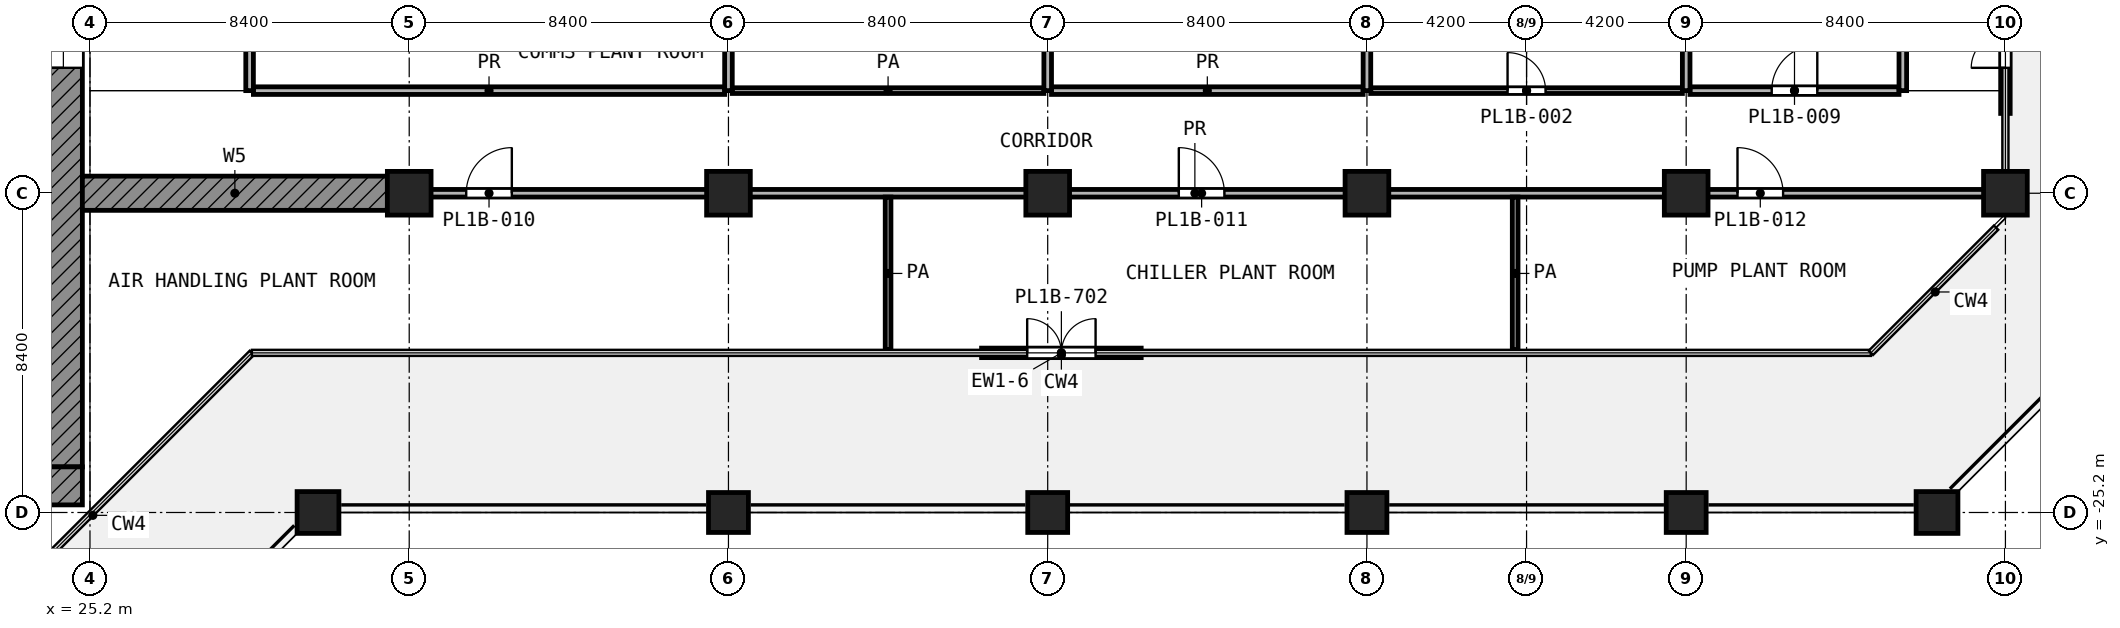
"""IFC4 building model, lengths in metres.
Left out: names, types, materials, properties, quantities, classifications, styles, units other than length and angle.
Written with IfcOpenShell. Run it as: python <this file> out.ifc"""

import sys

from ifc_helpers import new_model, si_unit, direction, frame, frame_2d, origin, origin_2d, place, context, subcontext, project, spatial, rectangle, extrude, element, fill, save


model = new_model("IFC4")
c1 = context("Model", 3, precision=1e-05, world=origin(), true_north=direction((0.0, 1.0)))
c2 = subcontext(c1, "Body", "Model", "MODEL_VIEW")
j1 = project(units=[si_unit("LENGTHUNIT", "METRE"), si_unit("PLANEANGLEUNIT", "RADIAN")], contexts=[c1])
p1 = place(None, origin())
s1 = spatial("IfcSite", under=j1, at=p1, CompositionType="ELEMENT")
p2 = place(p1, origin())
s2 = spatial("IfcBuilding", under=s1, at=p2, CompositionType="ELEMENT")
p3 = place(p2, frame((0.0, 0.0, 93.8)))
s3 = spatial("IfcBuildingStorey", under=s2, at=p3, CompositionType="ELEMENT", Elevation=93.8)
for number, where, z_axis, x_axis in (
    (1, (33.6, -16.8, 0.0), (0.0, 0.0, 1.0), (1.0, 0.0, 0.0)),
    (2, (42.0, -16.8, 0.0), (0.0, 0.0, 1.0), (1.0, 0.0, 0.0)),
    (3, (50.4, -16.8, 0.0), (0.0, 0.0, 1.0), (1.0, 0.0, 0.0)),
    (4, (58.8, -16.8, 0.0), (0.0, 0.0, 1.0), (1.0, 0.0, 0.0)),
    (5, (67.2, -16.8, 0.0), (0.0, 0.0, 1.0), (1.0, 0.0, 0.0)),
    (6, (75.6, -16.8, 0.0), (0.0, 0.0, 1.0), (1.0, 0.0, 0.0)),
):
    element("IfcColumn", number, at=place(p3, frame(where, z_axis=z_axis, x_axis=x_axis)), inside=s3, PredefinedType="COLUMN", context=c2, shape_type="SweptSolid", body=[
        extrude(rectangle(XDim=1.15, YDim=1.15, at=origin_2d()), origin(), (0.0, 0.0, 1.0), 5.0),
    ])
p4 = place(p3, frame((31.2, -25.2, 0.0), z_axis=(0.0, 0.0, 1.0), x_axis=(1.0, 0.0, 0.0)))
e7 = element("IfcColumn", 7, at=p4, inside=s3, PredefinedType="COLUMN", context=c2, shape_type="SweptSolid", body=[
    extrude(rectangle(XDim=1.1, YDim=1.1, at=origin_2d()), origin(), (0.0, 0.0, 1.0), 5.0),
])
for number, where, z_axis, x_axis in (
    (8, (42.0, -25.2, 0.0), (0.0, 0.0, 1.0), (1.0, 0.0, 0.0)),
    (9, (50.4, -25.2, 0.0), (0.0, 0.0, 1.0), (1.0, 0.0, 0.0)),
    (10, (58.8, -25.2, 0.0), (0.0, 0.0, 1.0), (1.0, 0.0, 0.0)),
    (11, (67.2, -25.2, 0.0), (0.0, 0.0, 1.0), (1.0, 0.0, 0.0)),
):
    element("IfcColumn", number, at=place(p3, frame(where, z_axis=z_axis, x_axis=x_axis)), inside=s3, PredefinedType="COLUMN", context=c2, shape_type="SweptSolid", body=[
        extrude(rectangle(XDim=1.05, YDim=1.05, at=origin_2d()), origin(), (0.0, 0.0, 1.0), 5.0),
    ])
p5 = place(p3, frame((73.8, -25.2, 0.0), z_axis=(0.0, 0.0, 1.0), x_axis=(1.0, 0.0, 0.0)))
e12 = element("IfcColumn", 12, at=p5, inside=s3, PredefinedType="COLUMN", context=c2, shape_type="SweptSolid", body=[
    extrude(rectangle(XDim=1.1, YDim=1.1, at=origin_2d()), origin(), (0.0, 0.0, 1.0), 5.0),
])
p6 = place(p3, frame((25.0, -16.8, 0.0), z_axis=(0.0, 0.0, 1.0), x_axis=(1.0, 0.0, 0.0)))
e13 = element("IfcWall", 13, at=p6, inside=s3, PredefinedType="SHEAR", context=c2, shape_type="SweptSolid", body=[
    extrude(rectangle(XDim=8.025, YDim=0.9, at=frame_2d((4.012, 0.0))), origin(), (0.0, 0.0, 1.0), 4.4),
])
p7 = place(p3, frame((48.66, -21.0, 0.0), z_axis=(0.0, 0.0, 1.0), x_axis=(1.0, 0.0, 0.0)))
e14 = element("IfcWall", 14, at=p7, inside=s3, PredefinedType="SOLIDWALL", context=c2, shape_type="SweptSolid", body=[
    extrude(rectangle(XDim=4.2, YDim=0.25, at=frame_2d((2.1, 0.0))), origin(), (0.0, 0.0, 1.0), 4.24),
])
p8 = place(p7, frame((1.2, 0.0, 0.0)))
e15 = element("IfcOpeningElement", 15, at=p8, cuts=e14, PredefinedType="OPENING", context=c2, shape_type="SweptSolid", body=[
    extrude(rectangle(XDim=1.8, YDim=2.1, at=frame_2d((0.9, 1.05))), frame((0.0, 0.135, 0.0), z_axis=(0.0, -1.0, 0.0), x_axis=(1.0, 0.0, 0.0)), (0.0, 0.0, 1.0), 0.27),
])
p9 = place(p3, frame((75.6, -14.7, 0.0), z_axis=(0.0, 0.0, 1.0), x_axis=(0.0, 1.0, 0.0)))
e16 = element("IfcWall", 16, at=p9, inside=s3, PredefinedType="SOLIDWALL", context=c2, shape_type="SweptSolid", body=[
    extrude(rectangle(XDim=4.2, YDim=0.25, at=frame_2d((2.1, 0.0))), origin(), (0.0, 0.0, 1.0), 4.24),
])
p10 = place(p9, frame((1.2, 0.0, 0.0)))
e17 = element("IfcOpeningElement", 17, at=p10, cuts=e16, PredefinedType="OPENING", context=c2, shape_type="SweptSolid", body=[
    extrude(rectangle(XDim=1.8, YDim=2.1, at=frame_2d((0.9, 1.05))), frame((0.0, 0.135, 0.0), z_axis=(0.0, -1.0, 0.0), x_axis=(1.0, 0.0, 0.0)), (0.0, 0.0, 1.0), 0.27),
])
p11 = place(p3, frame((24.5, -24.0, 0.0), z_axis=(0.0, 0.0, 1.0), x_axis=(0.0, 1.0, 0.0)))
e18 = element("IfcWall", 18, at=p11, inside=s3, PredefinedType="SHEAR", context=c2, shape_type="SweptSolid", body=[
    extrude(rectangle(XDim=18.6, YDim=1.0, at=frame_2d((9.3, 0.0))), origin(), (0.0, 0.0, 1.0), 4.4),
])
p12 = place(p11, frame((10.5, 0.0, 0.0)))
e19 = element("IfcOpeningElement", 19, at=p12, cuts=e18, PredefinedType="OPENING", context=c2, shape_type="SweptSolid", body=[
    extrude(rectangle(XDim=1.8, YDim=2.1, at=frame_2d((0.9, 1.05))), frame((0.0, 0.51, 0.0), z_axis=(0.0, -1.0, 0.0), x_axis=(1.0, 0.0, 0.0)), (0.0, 0.0, 1.0), 1.02),
])
p13 = place(p3, frame((24.5, -25.0, 0.0), z_axis=(0.0, 0.0, 1.0), x_axis=(0.0, 1.0, 0.0)))
e20 = element("IfcWall", 20, at=p13, inside=s3, PredefinedType="SHEAR", context=c2, shape_type="SweptSolid", body=[
    extrude(rectangle(XDim=1.0, YDim=1.0, at=frame_2d((0.5, 0.0))), origin(), (0.0, 0.0, 1.0), 4.4),
])
p14 = place(p3, frame((42.1, -14.1, 0.0), z_axis=(0.0, 0.0, 1.0), x_axis=(1.0, 0.0, 0.0)))
e21 = element("IfcWall", 21, at=p14, inside=s3, PredefinedType="PARTITIONING", context=c2, shape_type="SweptSolid", body=[
    extrude(rectangle(XDim=8.2, YDim=0.15, at=frame_2d((4.1, 0.0))), origin(), (0.0, 0.0, 1.0), 4.4),
])
p15 = place(p3, frame((58.9, -14.1, 0.0), z_axis=(0.0, 0.0, 1.0), x_axis=(1.0, 0.0, 0.0)))
e22 = element("IfcWall", 22, at=p15, inside=s3, PredefinedType="PARTITIONING", context=c2, shape_type="SweptSolid", body=[
    extrude(rectangle(XDim=8.2, YDim=0.15, at=frame_2d((4.1, 0.0))), origin(), (0.0, 0.0, 1.0), 4.4),
])
p16 = place(p15, frame((3.6, 0.0, 0.0)))
e23 = element("IfcOpeningElement", 23, at=p16, cuts=e22, PredefinedType="OPENING", context=c2, shape_type="SweptSolid", body=[
    extrude(rectangle(XDim=1.0, YDim=2.1, at=frame_2d((0.5, 1.05))), frame((0.0, 0.085, 0.0), z_axis=(0.0, -1.0, 0.0), x_axis=(1.0, 0.0, 0.0)), (0.0, 0.0, 1.0), 0.17),
])
for number, where, z_axis, x_axis in (
    (24, (46.2, -20.92, 0.0), (0.0, 0.0, 1.0), (0.0, 1.0, 0.0)),
    (25, (62.7, -20.92, 0.0), (0.0, 0.0, 1.0), (0.0, 1.0, 0.0)),
):
    element("IfcWall", number, at=place(p3, frame(where, z_axis=z_axis, x_axis=x_axis)), inside=s3, PredefinedType="PARTITIONING", context=c2, shape_type="SweptSolid", body=[
        extrude(rectangle(XDim=4.02, YDim=0.15, at=frame_2d((2.01, 0.0))), origin(), (0.0, 0.0, 1.0), 4.4),
    ])
p17 = place(p3, frame((33.025, -16.8, 0.0), z_axis=(0.0, 0.0, 1.0), x_axis=(1.0, 0.0, 0.0)))
e26 = element("IfcWall", 26, at=p17, inside=s3, PredefinedType="PARTITIONING", context=c2, shape_type="SweptSolid", body=[
    extrude(rectangle(XDim=42.495, YDim=0.2, at=frame_2d((21.248, 0.0))), origin(), (0.0, 0.0, 1.0), 4.4),
])
p18 = place(p17, frame((2.075, 0.0, 0.0)))
e27 = element("IfcOpeningElement", 27, at=p18, cuts=e26, PredefinedType="OPENING", context=c2, shape_type="SweptSolid", body=[
    extrude(rectangle(XDim=1.2, YDim=2.1, at=frame_2d((0.6, 1.05))), frame((0.0, 0.11, 0.0), z_axis=(0.0, -1.0, 0.0), x_axis=(1.0, 0.0, 0.0)), (0.0, 0.0, 1.0), 0.22),
])
p19 = place(p17, frame((20.825, 0.0, 0.0)))
e28 = element("IfcOpeningElement", 28, at=p19, cuts=e26, PredefinedType="OPENING", context=c2, shape_type="SweptSolid", body=[
    extrude(rectangle(XDim=1.2, YDim=2.1, at=frame_2d((0.6, 1.05))), frame((0.0, 0.11, 0.0), z_axis=(0.0, -1.0, 0.0), x_axis=(1.0, 0.0, 0.0)), (0.0, 0.0, 1.0), 0.22),
])
p20 = place(p17, frame((35.525, 0.0, 0.0)))
e29 = element("IfcOpeningElement", 29, at=p20, cuts=e26, PredefinedType="OPENING", context=c2, shape_type="SweptSolid", body=[
    extrude(rectangle(XDim=1.2, YDim=2.1, at=frame_2d((0.6, 1.05))), frame((0.0, 0.11, 0.0), z_axis=(0.0, -1.0, 0.0), x_axis=(1.0, 0.0, 0.0)), (0.0, 0.0, 1.0), 0.22),
])
p21 = place(p3, frame((29.5, -14.1, 0.0), z_axis=(0.0, 0.0, 1.0), x_axis=(1.0, 0.0, 0.0)))
e30 = element("IfcWall", 30, at=p21, inside=s3, PredefinedType="PARTITIONING", context=c2, shape_type="SweptSolid", body=[
    extrude(rectangle(XDim=12.4, YDim=0.2, at=frame_2d((6.2, 0.0))), origin(), (0.0, 0.0, 1.0), 4.4),
])
p22 = place(p3, frame((50.5, -14.1, 0.0), z_axis=(0.0, 0.0, 1.0), x_axis=(1.0, 0.0, 0.0)))
e31 = element("IfcWall", 31, at=p22, inside=s3, PredefinedType="PARTITIONING", context=c2, shape_type="SweptSolid", body=[
    extrude(rectangle(XDim=8.2, YDim=0.2, at=frame_2d((4.1, 0.0))), origin(), (0.0, 0.0, 1.0), 4.4),
])
p23 = place(p3, frame((67.3, -14.1, 0.0), z_axis=(0.0, 0.0, 1.0), x_axis=(1.0, 0.0, 0.0)))
e32 = element("IfcWall", 32, at=p23, inside=s3, PredefinedType="PARTITIONING", context=c2, shape_type="SweptSolid", body=[
    extrude(rectangle(XDim=5.5, YDim=0.2, at=frame_2d((2.75, 0.0))), origin(), (0.0, 0.0, 1.0), 4.4),
])
p24 = place(p23, frame((2.15, 0.0, 0.0)))
e33 = element("IfcOpeningElement", 33, at=p24, cuts=e32, PredefinedType="OPENING", context=c2, shape_type="SweptSolid", body=[
    extrude(rectangle(XDim=1.2, YDim=2.1, at=frame_2d((0.6, 1.05))), frame((0.0, 0.11, 0.0), z_axis=(0.0, -1.0, 0.0), x_axis=(1.0, 0.0, 0.0)), (0.0, 0.0, 1.0), 0.22),
])
p25 = place(p3, frame((29.4, -14.1, 0.0), z_axis=(0.0, 0.0, 1.0), x_axis=(0.0, 1.0, 0.0)))
e34 = element("IfcWall", 34, at=p25, inside=s3, PredefinedType="PARTITIONING", context=c2, shape_type="SweptSolid", body=[
    extrude(rectangle(XDim=2.997, YDim=0.2, at=frame_2d((1.499, 0.0))), origin(), (0.0, 0.0, 1.0), 4.4),
])
for number, where, z_axis, x_axis in (
    (35, (42.0, -14.1, 0.0), (0.0, 0.0, 1.0), (0.0, 1.0, 0.0)),
    (36, (50.4, -14.1, 0.0), (0.0, 0.0, 1.0), (0.0, 1.0, 0.0)),
    (37, (58.8, -14.1, 0.0), (0.0, 0.0, 1.0), (0.0, 1.0, 0.0)),
    (38, (67.2, -14.1, 0.0), (0.0, 0.0, 1.0), (0.0, 1.0, 0.0)),
):
    element("IfcWall", number, at=place(p3, frame(where, z_axis=z_axis, x_axis=x_axis)), inside=s3, PredefinedType="PARTITIONING", context=c2, shape_type="SweptSolid", body=[
        extrude(rectangle(XDim=3.0, YDim=0.2, at=frame_2d((1.5, 0.0))), origin(), (0.0, 0.0, 1.0), 4.4),
    ])
p26 = place(p3, frame((72.9, -14.1, 0.0), z_axis=(0.0, 0.0, 1.0), x_axis=(0.0, 1.0, 0.0)))
e39 = element("IfcWall", 39, at=p26, inside=s3, PredefinedType="PARTITIONING", context=c2, shape_type="SweptSolid", body=[
    extrude(rectangle(XDim=2.997, YDim=0.2, at=frame_2d((1.499, 0.0))), origin(), (0.0, 0.0, 1.0), 4.4),
])
p27 = place(p8, origin())
e40 = element("IfcDoor", 40, at=p27, inside=s3, OperationType="DOUBLE_DOOR_SINGLE_SWING", PredefinedType="DOOR", context=c2, shape_type="SweptSolid", body=[
    extrude(rectangle(XDim=1.8, YDim=2.1, at=frame_2d((0.9, 1.05))), frame((0.0, 0.025, 0.0), z_axis=(0.0, -1.0, 0.0), x_axis=(1.0, 0.0, 0.0)), (0.0, 0.0, 1.0), 0.05),
])
fill(e15, e40)
p28 = place(p10, origin())
e41 = element("IfcDoor", 41, at=p28, inside=s3, OperationType="DOUBLE_DOOR_SINGLE_SWING", PredefinedType="DOOR", context=c2, shape_type="SweptSolid", body=[
    extrude(rectangle(XDim=1.8, YDim=2.1, at=frame_2d((0.9, 1.05))), frame((0.0, 0.025, 0.0), z_axis=(0.0, -1.0, 0.0), x_axis=(1.0, 0.0, 0.0)), (0.0, 0.0, 1.0), 0.05),
])
fill(e17, e41)
p29 = place(p12, origin())
e42 = element("IfcDoor", 42, at=p29, inside=s3, OperationType="DOUBLE_DOOR_SINGLE_SWING", PredefinedType="DOOR", context=c2, shape_type="SweptSolid", body=[
    extrude(rectangle(XDim=1.8, YDim=2.1, at=frame_2d((0.9, 1.05))), frame((0.0, 0.025, 0.0), z_axis=(0.0, -1.0, 0.0), x_axis=(1.0, 0.0, 0.0)), (0.0, 0.0, 1.0), 0.05),
])
fill(e19, e42)
p30 = place(p16, origin())
e43 = element("IfcDoor", 43, at=p30, inside=s3, OperationType="SINGLE_SWING_LEFT", PredefinedType="DOOR", context=c2, shape_type="SweptSolid", body=[
    extrude(rectangle(XDim=1.0, YDim=2.1, at=frame_2d((0.5, 1.05))), frame((0.0, 0.025, 0.0), z_axis=(0.0, -1.0, 0.0), x_axis=(1.0, 0.0, 0.0)), (0.0, 0.0, 1.0), 0.05),
])
fill(e23, e43)
p31 = place(p24, origin())
e44 = element("IfcDoor", 44, at=p31, inside=s3, OperationType="SINGLE_SWING_RIGHT", PredefinedType="DOOR", context=c2, shape_type="SweptSolid", body=[
    extrude(rectangle(XDim=1.2, YDim=2.1, at=frame_2d((0.6, 1.05))), frame((0.0, 0.025, 0.0), z_axis=(0.0, -1.0, 0.0), x_axis=(1.0, 0.0, 0.0)), (0.0, 0.0, 1.0), 0.05),
])
fill(e33, e44)
p32 = place(p18, origin())
e45 = element("IfcDoor", 45, at=p32, inside=s3, OperationType="SINGLE_SWING_RIGHT", PredefinedType="DOOR", context=c2, shape_type="SweptSolid", body=[
    extrude(rectangle(XDim=1.2, YDim=2.1, at=frame_2d((0.6, 1.05))), frame((0.0, 0.025, 0.0), z_axis=(0.0, -1.0, 0.0), x_axis=(1.0, 0.0, 0.0)), (0.0, 0.0, 1.0), 0.05),
])
fill(e27, e45)
p33 = place(p19, origin())
e46 = element("IfcDoor", 46, at=p33, inside=s3, OperationType="SINGLE_SWING_LEFT", PredefinedType="DOOR", context=c2, shape_type="SweptSolid", body=[
    extrude(rectangle(XDim=1.2, YDim=2.1, at=frame_2d((0.6, 1.05))), frame((0.0, 0.025, 0.0), z_axis=(0.0, -1.0, 0.0), x_axis=(1.0, 0.0, 0.0)), (0.0, 0.0, 1.0), 0.05),
])
fill(e28, e46)
p34 = place(p20, origin())
e47 = element("IfcDoor", 47, at=p34, inside=s3, OperationType="SINGLE_SWING_LEFT", PredefinedType="DOOR", context=c2, shape_type="SweptSolid", body=[
    extrude(rectangle(XDim=1.2, YDim=2.1, at=frame_2d((0.6, 1.05))), frame((0.0, 0.025, 0.0), z_axis=(0.0, -1.0, 0.0), x_axis=(1.0, 0.0, 0.0)), (0.0, 0.0, 1.0), 0.05),
])
fill(e29, e47)
save(model, sys.argv[1])
